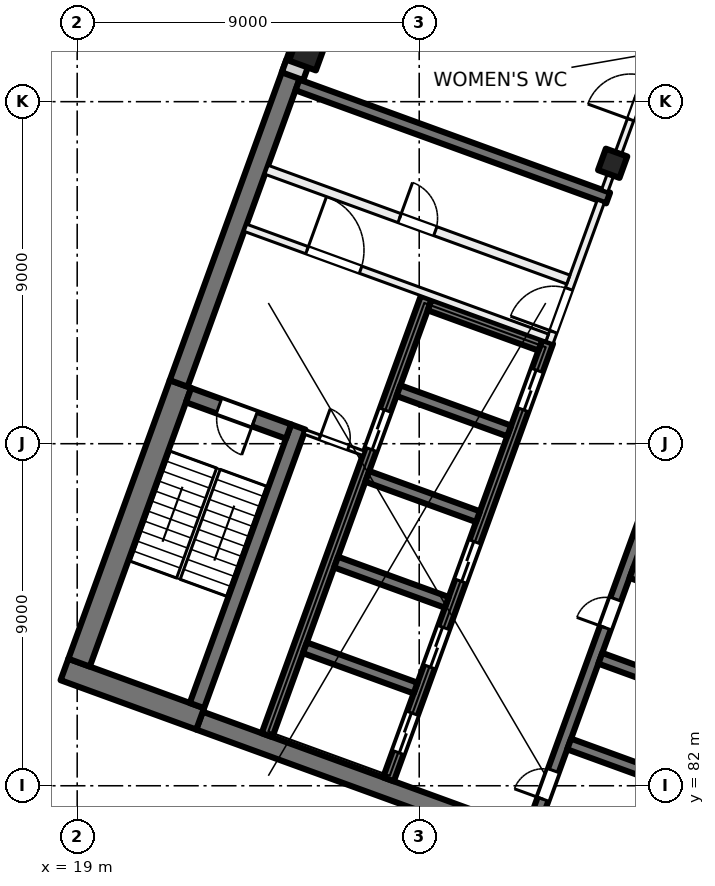
"""IFC4 building model, lengths in metres.
Left out: names, types, materials, properties, quantities, classifications, styles, units other than length and angle.
Written with IfcOpenShell. Run it as: python <this file> out.ifc"""

import sys

from ifc_helpers import new_model, si_unit, direction, frame, frame_2d, origin, origin_2d, place, context, subcontext, project, spatial, rectangle, extrude, element, fill, save


model = new_model("IFC4")
c1 = context("Model", 3, precision=1e-05, world=origin(), true_north=direction((0.0, 1.0)))
c2 = subcontext(c1, "Body", "Model", "MODEL_VIEW")
j1 = project(units=[si_unit("LENGTHUNIT", "METRE"), si_unit("PLANEANGLEUNIT", "RADIAN")], contexts=[c1])
p1 = place(None, origin())
s1 = spatial("IfcSite", under=j1, at=p1, CompositionType="ELEMENT")
p2 = place(p1, origin())
s2 = spatial("IfcBuilding", under=s1, at=p2, CompositionType="ELEMENT")
p3 = place(p2, frame((0.0, 0.0, 232.0)))
s3 = spatial("IfcBuildingStorey", under=s2, at=p3, CompositionType="ELEMENT", Elevation=232.0)
p4 = place(p3, frame((33.091, 98.379, 0.0), z_axis=(0.0, 0.0, 1.0), x_axis=(-0.342020143326, -0.939692620786, 0.0)))
e1 = element("IfcColumn", 1, at=p4, inside=s3, PredefinedType="COLUMN", context=c2, shape_type="SweptSolid", body=[
    extrude(rectangle(XDim=0.6, YDim=0.6, at=origin_2d()), origin(), (0.0, 0.0, 1.0), 4.0),
])
p5 = place(p3, frame((25.056, 101.303, 0.0), z_axis=(0.0, 0.0, 1.0), x_axis=(-0.342020143326, -0.939692620786, 0.0)))
e2 = element("IfcColumn", 2, at=p5, inside=s3, PredefinedType="COLUMN", context=c2, shape_type="SweptSolid", body=[
    extrude(rectangle(XDim=0.75, YDim=0.75, at=origin_2d()), origin(), (0.0, 0.0, 1.0), 4.0),
])
p6 = place(p3, frame((35.75, 78.788, 0.0), z_axis=(0.0, 0.0, 1.0), x_axis=(-0.939692894512, 0.342019391267, 0.0)))
e3 = element("IfcWall", 3, at=p6, inside=s3, PredefinedType="SHEAR", context=c2, shape_type="SweptSolid", body=[
    extrude(rectangle(XDim=14.4, YDim=0.5, at=frame_2d((7.2, 0.0))), origin(), (0.0, 0.0, 1.0), 4.0),
])
p7 = place(p3, frame((22.236, 83.76, 0.0), z_axis=(0.0, 0.0, 1.0), x_axis=(-0.939680822529, 0.342052557032, 0.0)))
e4 = element("IfcWall", 4, at=p7, inside=s3, PredefinedType="SHEAR", context=c2, shape_type="SweptSolid", body=[
    extrude(rectangle(XDim=3.8, YDim=0.6, at=frame_2d((1.9, 0.0))), origin(), (0.0, 0.0, 1.0), 4.0),
])
p8 = place(p3, frame((19.05, 85.239, 0.0), z_axis=(0.0, 0.0, 1.0), x_axis=(0.342016982193, 0.939693771338, 0.0)))
e5 = element("IfcWall", 5, at=p8, inside=s3, PredefinedType="SHEAR", context=c2, shape_type="SweptSolid", body=[
    extrude(rectangle(XDim=7.8, YDim=0.6, at=frame_2d((3.9, 0.0))), origin(), (0.0, 0.0, 1.0), 4.0),
])
p9 = place(p3, frame((21.67, 92.585, 0.0), z_axis=(0.0, 0.0, 1.0), x_axis=(0.342035714298, 0.93968695327, 0.0)))
e6 = element("IfcWall", 6, at=p9, inside=s3, PredefinedType="SHEAR", context=c2, shape_type="SweptSolid", body=[
    extrude(rectangle(XDim=8.975, YDim=0.5, at=frame_2d((4.488, 0.0))), origin(), (0.0, 0.0, 1.0), 4.0),
])
p10 = place(p3, frame((22.15, 84.11, 0.0), z_axis=(0.0, 0.0, 1.0), x_axis=(0.342016982193, 0.939693771338, 0.0)))
e7 = element("IfcWall", 7, at=p10, inside=s3, PredefinedType="SHEAR", context=c2, shape_type="SweptSolid", body=[
    extrude(rectangle(XDim=7.8, YDim=0.4, at=frame_2d((3.9, 0.0))), origin(), (0.0, 0.0, 1.0), 4.0),
])
p11 = place(p3, frame((24.562, 91.32, 0.0), z_axis=(0.0, 0.0, 1.0), x_axis=(-0.939717030584, 0.341953070509, 0.0)))
e8 = element("IfcWall", 8, at=p11, inside=s3, PredefinedType="SHEAR", context=c2, shape_type="SweptSolid", body=[
    extrude(rectangle(XDim=2.8, YDim=0.4, at=frame_2d((1.4, 0.0))), origin(), (0.0, 0.0, 1.0), 4.0),
])
p12 = place(p11, frame((0.95, 0.0, 0.0)))
e9 = element("IfcOpeningElement", 9, at=p12, cuts=e8, PredefinedType="OPENING", context=c2, shape_type="SweptSolid", body=[
    extrude(rectangle(XDim=1.0, YDim=2.1, at=frame_2d((0.5, 1.05))), frame((0.0, 0.21, 0.0), z_axis=(0.0, -1.0, 0.0), x_axis=(1.0, 0.0, 0.0)), (0.0, 0.0, 1.0), 0.42),
])
p13 = place(p3, frame((30.949, 80.801, 0.0), z_axis=(0.0, 0.0, 1.0), x_axis=(0.342016684409, 0.939693879721, 0.0)))
e10 = element("IfcWall", 10, at=p13, inside=s3, PredefinedType="SHEAR", context=c2, shape_type="SweptSolid", body=[
    extrude(rectangle(XDim=12.25, YDim=0.3, at=frame_2d((6.125, 0.0))), origin(), (0.0, 0.0, 1.0), 4.0),
])
p14 = place(p13, frame((0.9, 0.0, 0.0)))
e11 = element("IfcOpeningElement", 11, at=p14, cuts=e10, PredefinedType="OPENING", context=c2, shape_type="SweptSolid", body=[
    extrude(rectangle(XDim=0.8, YDim=2.1, at=frame_2d((0.4, 1.05))), frame((0.0, 0.16, 0.0), z_axis=(0.0, -1.0, 0.0), x_axis=(1.0, 0.0, 0.0)), (0.0, 0.0, 1.0), 0.32),
])
p15 = place(p13, frame((5.7, 0.0, 0.0)))
e12 = element("IfcOpeningElement", 12, at=p15, cuts=e10, PredefinedType="OPENING", context=c2, shape_type="SweptSolid", body=[
    extrude(rectangle(XDim=0.8, YDim=2.1, at=frame_2d((0.4, 1.05))), frame((0.0, 0.16, 0.0), z_axis=(0.0, -1.0, 0.0), x_axis=(1.0, 0.0, 0.0)), (0.0, 0.0, 1.0), 0.32),
])
p16 = place(p3, frame((34.858, 82.039, 0.0), z_axis=(0.0, 0.0, 1.0), x_axis=(-0.939689908313, 0.342027595692, 0.0)))
e13 = element("IfcWall", 13, at=p16, inside=s3, PredefinedType="SHEAR", context=c2, shape_type="SweptSolid", body=[
    extrude(rectangle(XDim=3.1, YDim=0.3, at=frame_2d((1.55, 0.0))), origin(), (0.0, 0.0, 1.0), 4.0),
])
p17 = place(p3, frame((35.679, 84.294, 0.0), z_axis=(0.0, 0.0, 1.0), x_axis=(-0.939706007505, 0.341983361377, 0.0)))
e14 = element("IfcWall", 14, at=p17, inside=s3, PredefinedType="SHEAR", context=c2, shape_type="SweptSolid", body=[
    extrude(rectangle(XDim=3.1, YDim=0.3, at=frame_2d((1.55, 0.0))), origin(), (0.0, 0.0, 1.0), 4.0),
])
p18 = place(p3, frame((36.5, 86.549, 0.0), z_axis=(0.0, 0.0, 1.0), x_axis=(-0.939689908313, 0.342027595692, 0.0)))
e15 = element("IfcWall", 15, at=p18, inside=s3, PredefinedType="SHEAR", context=c2, shape_type="SweptSolid", body=[
    extrude(rectangle(XDim=3.1, YDim=0.3, at=frame_2d((1.55, 0.0))), origin(), (0.0, 0.0, 1.0), 4.0),
])
p19 = place(p3, frame((27.191, 82.169, 0.0), z_axis=(0.0, 0.0, 1.0), x_axis=(0.342016684409, 0.939693879721, 0.0)))
e16 = element("IfcWall", 16, at=p19, inside=s3, PredefinedType="SHEAR", context=c2, shape_type="SweptSolid", body=[
    extrude(rectangle(XDim=12.25, YDim=0.3, at=frame_2d((6.125, 0.0))), origin(), (0.0, 0.0, 1.0), 4.0),
])
p20 = place(p19, frame((0.75, 0.0, 0.0)))
e17 = element("IfcOpeningElement", 17, at=p20, cuts=e16, PredefinedType="OPENING", context=c2, shape_type="SweptSolid", body=[
    extrude(rectangle(XDim=1.1, YDim=2.1, at=frame_2d((0.55, 1.05))), frame((0.0, 0.16, 0.0), z_axis=(0.0, -1.0, 0.0), x_axis=(1.0, 0.0, 0.0)), (0.0, 0.0, 1.0), 0.32),
])
p21 = place(p19, frame((3.15, 0.0, 0.0)))
e18 = element("IfcOpeningElement", 18, at=p21, cuts=e16, PredefinedType="OPENING", context=c2, shape_type="SweptSolid", body=[
    extrude(rectangle(XDim=1.1, YDim=2.1, at=frame_2d((0.55, 1.05))), frame((0.0, 0.16, 0.0), z_axis=(0.0, -1.0, 0.0), x_axis=(1.0, 0.0, 0.0)), (0.0, 0.0, 1.0), 0.32),
])
p22 = place(p19, frame((5.55, 0.0, 0.0)))
e19 = element("IfcOpeningElement", 19, at=p22, cuts=e16, PredefinedType="OPENING", context=c2, shape_type="SweptSolid", body=[
    extrude(rectangle(XDim=1.1, YDim=2.1, at=frame_2d((0.55, 1.05))), frame((0.0, 0.16, 0.0), z_axis=(0.0, -1.0, 0.0), x_axis=(1.0, 0.0, 0.0)), (0.0, 0.0, 1.0), 0.32),
])
p23 = place(p19, frame((10.35, 0.0, 0.0)))
e20 = element("IfcOpeningElement", 20, at=p23, cuts=e16, PredefinedType="OPENING", context=c2, shape_type="SweptSolid", body=[
    extrude(rectangle(XDim=1.1, YDim=2.1, at=frame_2d((0.55, 1.05))), frame((0.0, 0.16, 0.0), z_axis=(0.0, -1.0, 0.0), x_axis=(1.0, 0.0, 0.0)), (0.0, 0.0, 1.0), 0.32),
])
p24 = place(p3, frame((23.996, 83.332, 0.0), z_axis=(0.0, 0.0, 1.0), x_axis=(0.342016684409, 0.939693879721, 0.0)))
e21 = element("IfcWall", 21, at=p24, inside=s3, PredefinedType="SHEAR", context=c2, shape_type="SweptSolid", body=[
    extrude(rectangle(XDim=12.25, YDim=0.3, at=frame_2d((6.125, 0.0))), origin(), (0.0, 0.0, 1.0), 4.0),
])
p25 = place(p24, frame((8.0, 0.0, 0.0)))
e22 = element("IfcOpeningElement", 22, at=p25, cuts=e21, PredefinedType="OPENING", context=c2, shape_type="SweptSolid", body=[
    extrude(rectangle(XDim=1.1, YDim=2.1, at=frame_2d((0.55, 1.05))), frame((0.0, 0.16, 0.0), z_axis=(0.0, -1.0, 0.0), x_axis=(1.0, 0.0, 0.0)), (0.0, 0.0, 1.0), 0.32),
])
for number, where, z_axis, x_axis in (
    (23, (27.905, 84.57, 0.0), (0.0, 0.0, 1.0), (-0.94, 0.342, 0.0)),
    (24, (28.726, 86.825, 0.0), (0.0, 0.0, 1.0), (-0.94, 0.342, 0.0)),
    (25, (29.546, 89.08, 0.0), (0.0, 0.0, 1.0), (-0.94, 0.342, 0.0)),
):
    element("IfcWall", number, at=place(p3, frame(where, z_axis=z_axis, x_axis=x_axis)), inside=s3, PredefinedType="SHEAR", context=c2, shape_type="SweptSolid", body=[
        extrude(rectangle(XDim=3.1, YDim=0.3, at=frame_2d((1.55, 0.0))), origin(), (0.0, 0.0, 1.0), 4.0),
    ])
for number, where, z_axis, x_axis in (
    (26, (30.367, 91.336, 0.0), (0.0, 0.0, 1.0), (-0.94, 0.342, 0.0)),
    (27, (31.188, 93.591, 0.0), (0.0, 0.0, 1.0), (-0.94, 0.342, 0.0)),
):
    element("IfcWall", number, at=place(p3, frame(where, z_axis=z_axis, x_axis=x_axis)), inside=s3, PredefinedType="SHEAR", context=c2, shape_type="SweptSolid", body=[
        extrude(rectangle(XDim=3.1, YDim=0.3, at=frame_2d((1.55, 0.0))), origin(), (0.0, 0.0, 1.0), 4.0),
    ])
p26 = place(p3, frame((32.971, 97.465, 0.0), z_axis=(0.0, 0.0, 1.0), x_axis=(-0.939695066972, 0.34201342241, 0.0)))
e28 = element("IfcWall", 28, at=p26, inside=s3, PredefinedType="SHEAR", context=c2, shape_type="SweptSolid", body=[
    extrude(rectangle(XDim=8.7, YDim=0.3, at=frame_2d((4.35, 0.0))), origin(), (0.0, 0.0, 1.0), 4.0),
])
p27 = place(p3, frame((24.666, 100.669, 0.0), z_axis=(0.0, 0.0, 1.0), x_axis=(0.34201964167, 0.939692803373, 0.0)))
e29 = element("IfcWall", 29, at=p27, inside=s3, PredefinedType="SOLIDWALL", context=c2, shape_type="SweptSolid", body=[
    extrude(rectangle(XDim=32.884, YDim=0.6, at=frame_2d((16.442, 0.0))), origin(), (0.0, 0.0, 1.0), 3.625),
])
p28 = place(p27, frame((1.48, 0.0, 0.9)))
e30 = element("IfcOpeningElement", 30, at=p28, cuts=e29, PredefinedType="OPENING", context=c2, shape_type="SweptSolid", body=[
    extrude(rectangle(XDim=3.0, YDim=2.4, at=frame_2d((1.5, 1.2))), frame((0.0, 0.31, 0.0), z_axis=(0.0, -1.0, 0.0), x_axis=(1.0, 0.0, 0.0)), (0.0, 0.0, 1.0), 0.62),
])
p29 = place(p27, frame((5.98, 0.0, 0.9)))
e31 = element("IfcOpeningElement", 31, at=p29, cuts=e29, PredefinedType="OPENING", context=c2, shape_type="SweptSolid", body=[
    extrude(rectangle(XDim=3.0, YDim=2.4, at=frame_2d((1.5, 1.2))), frame((0.0, 0.31, 0.0), z_axis=(0.0, -1.0, 0.0), x_axis=(1.0, 0.0, 0.0)), (0.0, 0.0, 1.0), 0.62),
])
p30 = place(p27, frame((10.48, 0.0, 0.9)))
e32 = element("IfcOpeningElement", 32, at=p30, cuts=e29, PredefinedType="OPENING", context=c2, shape_type="SweptSolid", body=[
    extrude(rectangle(XDim=3.0, YDim=2.4, at=frame_2d((1.5, 1.2))), frame((0.0, 0.31, 0.0), z_axis=(0.0, -1.0, 0.0), x_axis=(1.0, 0.0, 0.0)), (0.0, 0.0, 1.0), 0.62),
])
p31 = place(p27, frame((14.98, 0.0, 0.9)))
e33 = element("IfcOpeningElement", 33, at=p31, cuts=e29, PredefinedType="OPENING", context=c2, shape_type="SweptSolid", body=[
    extrude(rectangle(XDim=3.0, YDim=2.4, at=frame_2d((1.5, 1.2))), frame((0.0, 0.31, 0.0), z_axis=(0.0, -1.0, 0.0), x_axis=(1.0, 0.0, 0.0)), (0.0, 0.0, 1.0), 0.62),
])
p32 = place(p27, frame((19.48, 0.0, 0.9)))
e34 = element("IfcOpeningElement", 34, at=p32, cuts=e29, PredefinedType="OPENING", context=c2, shape_type="SweptSolid", body=[
    extrude(rectangle(XDim=3.0, YDim=2.4, at=frame_2d((1.5, 1.2))), frame((0.0, 0.31, 0.0), z_axis=(0.0, -1.0, 0.0), x_axis=(1.0, 0.0, 0.0)), (0.0, 0.0, 1.0), 0.62),
])
p33 = place(p27, frame((23.98, 0.0, 0.9)))
e35 = element("IfcOpeningElement", 35, at=p33, cuts=e29, PredefinedType="OPENING", context=c2, shape_type="SweptSolid", body=[
    extrude(rectangle(XDim=3.0, YDim=2.4, at=frame_2d((1.5, 1.2))), frame((0.0, 0.31, 0.0), z_axis=(0.0, -1.0, 0.0), x_axis=(1.0, 0.0, 0.0)), (0.0, 0.0, 1.0), 0.62),
])
p34 = place(p27, frame((28.48, 0.0, 0.9)))
e36 = element("IfcOpeningElement", 36, at=p34, cuts=e29, PredefinedType="OPENING", context=c2, shape_type="SweptSolid", body=[
    extrude(rectangle(XDim=3.0, YDim=2.4, at=frame_2d((1.5, 1.2))), frame((0.0, 0.31, 0.0), z_axis=(0.0, -1.0, 0.0), x_axis=(1.0, 0.0, 0.0)), (0.0, 0.0, 1.0), 0.62),
])
p35 = place(p3, frame((31.427, 93.663, 0.0), z_axis=(0.0, 0.0, 1.0), x_axis=(0.342030870568, 0.93968871632, 0.0)))
e37 = element("IfcWall", 37, at=p35, inside=s3, PredefinedType="PARTITIONING", context=c2, shape_type="SweptSolid", body=[
    extrude(rectangle(XDim=3.95, YDim=0.2, at=frame_2d((1.975, 0.0))), origin(), (0.0, 0.0, 1.0), 3.625),
])
p36 = place(p35, frame((0.3, 0.0, 0.0)))
e38 = element("IfcOpeningElement", 38, at=p36, cuts=e37, PredefinedType="OPENING", context=c2, shape_type="SweptSolid", body=[
    extrude(rectangle(XDim=1.2, YDim=2.1, at=frame_2d((0.6, 1.05))), frame((0.0, 0.11, 0.0), z_axis=(0.0, -1.0, 0.0), x_axis=(1.0, 0.0, 0.0)), (0.0, 0.0, 1.0), 0.22),
])
p37 = place(p3, frame((23.427, 96.682, 0.0), z_axis=(0.0, 0.0, 1.0), x_axis=(0.939690465531, -0.342026064782, 0.0)))
e39 = element("IfcWall", 39, at=p37, inside=s3, PredefinedType="PARTITIONING", context=c2, shape_type="SweptSolid", body=[
    extrude(rectangle(XDim=8.45, YDim=0.2, at=frame_2d((4.225, 0.0))), origin(), (0.0, 0.0, 1.0), 3.625),
])
p38 = place(p37, frame((1.725, 0.0, 0.0)))
e40 = element("IfcOpeningElement", 40, at=p38, cuts=e39, PredefinedType="OPENING", context=c2, shape_type="SweptSolid", body=[
    extrude(rectangle(XDim=1.5, YDim=2.1, at=frame_2d((0.75, 1.05))), frame((0.0, 0.11, 0.0), z_axis=(0.0, -1.0, 0.0), x_axis=(1.0, 0.0, 0.0)), (0.0, 0.0, 1.0), 0.22),
])
p39 = place(p3, frame((23.983, 98.208, 0.0), z_axis=(0.0, 0.0, 1.0), x_axis=(0.939699751196, -0.342000552051, 0.0)))
e41 = element("IfcWall", 41, at=p39, inside=s3, PredefinedType="PARTITIONING", context=c2, shape_type="SweptSolid", body=[
    extrude(rectangle(XDim=8.45, YDim=0.25, at=frame_2d((4.225, 0.0))), origin(), (0.0, 0.0, 1.0), 3.625),
])
p40 = place(p39, frame((3.725, 0.0, 0.0)))
e42 = element("IfcOpeningElement", 42, at=p40, cuts=e41, PredefinedType="OPENING", context=c2, shape_type="SweptSolid", body=[
    extrude(rectangle(XDim=1.0, YDim=2.1, at=frame_2d((0.5, 1.05))), frame((0.0, 0.135, 0.0), z_axis=(0.0, -1.0, 0.0), x_axis=(1.0, 0.0, 0.0)), (0.0, 0.0, 1.0), 0.27),
])
p41 = place(p3, frame((24.985, 91.312, 0.0), z_axis=(0.0, 0.0, 1.0), x_axis=(0.939719959755, -0.341945020783, 0.0)))
e43 = element("IfcWall", 43, at=p41, inside=s3, PredefinedType="PARTITIONING", context=c2, shape_type="SweptSolid", body=[
    extrude(rectangle(XDim=1.65, YDim=0.125, at=frame_2d((0.825, 0.0))), origin(), (0.0, 0.0, 1.0), 3.625),
])
p42 = place(p41, frame((0.425, 0.0, 0.0)))
e44 = element("IfcOpeningElement", 44, at=p42, cuts=e43, PredefinedType="OPENING", context=c2, shape_type="SweptSolid", body=[
    extrude(rectangle(XDim=0.8, YDim=2.1, at=frame_2d((0.4, 1.05))), frame((0.0, 0.073, 0.0), z_axis=(0.0, -1.0, 0.0), x_axis=(1.0, 0.0, 0.0)), (0.0, 0.0, 1.0), 0.145),
])
p43 = place(p3, frame((32.881, 97.657, 0.0), z_axis=(0.0, 0.0, 1.0), x_axis=(0.342058204353, 0.939678766832, 0.0)))
e45 = element("IfcWall", 45, at=p43, inside=s3, PredefinedType="PARTITIONING", context=c2, shape_type="SweptSolid", body=[
    extrude(rectangle(XDim=5.163, YDim=0.175, at=frame_2d((2.581, 0.0))), origin(), (0.0, 0.0, 1.0), 3.625),
])
p44 = place(p43, frame((1.991, 0.0, 0.0)))
e46 = element("IfcOpeningElement", 46, at=p44, cuts=e45, PredefinedType="OPENING", context=c2, shape_type="SweptSolid", body=[
    extrude(rectangle(XDim=1.2, YDim=2.1, at=frame_2d((0.6, 1.05))), frame((0.0, 0.097, 0.0), z_axis=(0.0, -1.0, 0.0), x_axis=(1.0, 0.0, 0.0)), (0.0, 0.0, 1.0), 0.195),
])
p45 = place(p20, origin())
e47 = element("IfcDoor", 47, at=p45, inside=s3, OperationType="DOUBLE_DOOR_SLIDING", PredefinedType="DOOR", context=c2, shape_type="SweptSolid", body=[
    extrude(rectangle(XDim=1.1, YDim=2.1, at=frame_2d((0.55, 1.05))), frame((0.0, 0.025, 0.0), z_axis=(0.0, -1.0, 0.0), x_axis=(1.0, 0.0, 0.0)), (0.0, 0.0, 1.0), 0.05),
])
fill(e17, e47)
p46 = place(p21, origin())
e48 = element("IfcDoor", 48, at=p46, inside=s3, OperationType="DOUBLE_DOOR_SLIDING", PredefinedType="DOOR", context=c2, shape_type="SweptSolid", body=[
    extrude(rectangle(XDim=1.1, YDim=2.1, at=frame_2d((0.55, 1.05))), frame((0.0, 0.025, 0.0), z_axis=(0.0, -1.0, 0.0), x_axis=(1.0, 0.0, 0.0)), (0.0, 0.0, 1.0), 0.05),
])
fill(e18, e48)
p47 = place(p22, origin())
e49 = element("IfcDoor", 49, at=p47, inside=s3, OperationType="DOUBLE_DOOR_SLIDING", PredefinedType="DOOR", context=c2, shape_type="SweptSolid", body=[
    extrude(rectangle(XDim=1.1, YDim=2.1, at=frame_2d((0.55, 1.05))), frame((0.0, 0.025, 0.0), z_axis=(0.0, -1.0, 0.0), x_axis=(1.0, 0.0, 0.0)), (0.0, 0.0, 1.0), 0.05),
])
fill(e19, e49)
p48 = place(p23, origin())
e50 = element("IfcDoor", 50, at=p48, inside=s3, OperationType="DOUBLE_DOOR_SLIDING", PredefinedType="DOOR", context=c2, shape_type="SweptSolid", body=[
    extrude(rectangle(XDim=1.1, YDim=2.1, at=frame_2d((0.55, 1.05))), frame((0.0, 0.025, 0.0), z_axis=(0.0, -1.0, 0.0), x_axis=(1.0, 0.0, 0.0)), (0.0, 0.0, 1.0), 0.05),
])
fill(e20, e50)
p49 = place(p14, origin())
e51 = element("IfcDoor", 51, at=p49, inside=s3, OperationType="SINGLE_SWING_LEFT", PredefinedType="DOOR", context=c2, shape_type="SweptSolid", body=[
    extrude(rectangle(XDim=0.8, YDim=2.1, at=frame_2d((0.4, 1.05))), frame((0.0, 0.025, 0.0), z_axis=(0.0, -1.0, 0.0), x_axis=(1.0, 0.0, 0.0)), (0.0, 0.0, 1.0), 0.05),
])
fill(e11, e51)
p50 = place(p15, origin())
e52 = element("IfcDoor", 52, at=p50, inside=s3, OperationType="SINGLE_SWING_RIGHT", PredefinedType="DOOR", context=c2, shape_type="SweptSolid", body=[
    extrude(rectangle(XDim=0.8, YDim=2.1, at=frame_2d((0.4, 1.05))), frame((0.0, 0.025, 0.0), z_axis=(0.0, -1.0, 0.0), x_axis=(1.0, 0.0, 0.0)), (0.0, 0.0, 1.0), 0.05),
])
fill(e12, e52)
p51 = place(p36, origin())
e53 = element("IfcDoor", 53, at=p51, inside=s3, OperationType="DOUBLE_DOOR_SINGLE_SWING", PredefinedType="DOOR", context=c2, shape_type="SweptSolid", body=[
    extrude(rectangle(XDim=1.2, YDim=2.1, at=frame_2d((0.6, 1.05))), frame((0.0, 0.025, 0.0), z_axis=(0.0, -1.0, 0.0), x_axis=(1.0, 0.0, 0.0)), (0.0, 0.0, 1.0), 0.05),
])
fill(e38, e53)
p52 = place(p38, origin())
e54 = element("IfcDoor", 54, at=p52, inside=s3, OperationType="DOUBLE_DOOR_SINGLE_SWING", PredefinedType="DOOR", context=c2, shape_type="SweptSolid", body=[
    extrude(rectangle(XDim=1.5, YDim=2.1, at=frame_2d((0.75, 1.05))), frame((0.0, 0.025, 0.0), z_axis=(0.0, -1.0, 0.0), x_axis=(1.0, 0.0, 0.0)), (0.0, 0.0, 1.0), 0.05),
])
fill(e40, e54)
p53 = place(p12, origin())
e55 = element("IfcDoor", 55, at=p53, inside=s3, OperationType="SINGLE_SWING_LEFT", PredefinedType="DOOR", context=c2, shape_type="SweptSolid", body=[
    extrude(rectangle(XDim=1.0, YDim=2.1, at=frame_2d((0.5, 1.05))), frame((0.0, 0.025, 0.0), z_axis=(0.0, -1.0, 0.0), x_axis=(1.0, 0.0, 0.0)), (0.0, 0.0, 1.0), 0.05),
])
fill(e9, e55)
p54 = place(p42, origin())
e56 = element("IfcDoor", 56, at=p54, inside=s3, OperationType="SINGLE_SWING_RIGHT", PredefinedType="DOOR", context=c2, shape_type="SweptSolid", body=[
    extrude(rectangle(XDim=0.8, YDim=2.1, at=frame_2d((0.4, 1.05))), frame((0.0, 0.025, 0.0), z_axis=(0.0, -1.0, 0.0), x_axis=(1.0, 0.0, 0.0)), (0.0, 0.0, 1.0), 0.05),
])
fill(e44, e56)
p55 = place(p40, origin())
e57 = element("IfcDoor", 57, at=p55, inside=s3, OperationType="SINGLE_SWING_LEFT", PredefinedType="DOOR", context=c2, shape_type="SweptSolid", body=[
    extrude(rectangle(XDim=1.0, YDim=2.1, at=frame_2d((0.5, 1.05))), frame((0.0, 0.025, 0.0), z_axis=(0.0, -1.0, 0.0), x_axis=(1.0, 0.0, 0.0)), (0.0, 0.0, 1.0), 0.05),
])
fill(e42, e57)
p56 = place(p25, origin())
e58 = element("IfcDoor", 58, at=p56, inside=s3, OperationType="DOUBLE_DOOR_SLIDING", PredefinedType="DOOR", context=c2, shape_type="SweptSolid", body=[
    extrude(rectangle(XDim=1.1, YDim=2.1, at=frame_2d((0.55, 1.05))), frame((0.0, 0.025, 0.0), z_axis=(0.0, -1.0, 0.0), x_axis=(1.0, 0.0, 0.0)), (0.0, 0.0, 1.0), 0.05),
])
fill(e22, e58)
p57 = place(p44, origin())
e59 = element("IfcDoor", 59, at=p57, inside=s3, OperationType="DOUBLE_DOOR_SINGLE_SWING", PredefinedType="DOOR", context=c2, shape_type="SweptSolid", body=[
    extrude(rectangle(XDim=1.2, YDim=2.1, at=frame_2d((0.6, 1.05))), frame((0.0, 0.025, 0.0), z_axis=(0.0, -1.0, 0.0), x_axis=(1.0, 0.0, 0.0)), (0.0, 0.0, 1.0), 0.05),
])
fill(e46, e59)
save(model, sys.argv[1])
